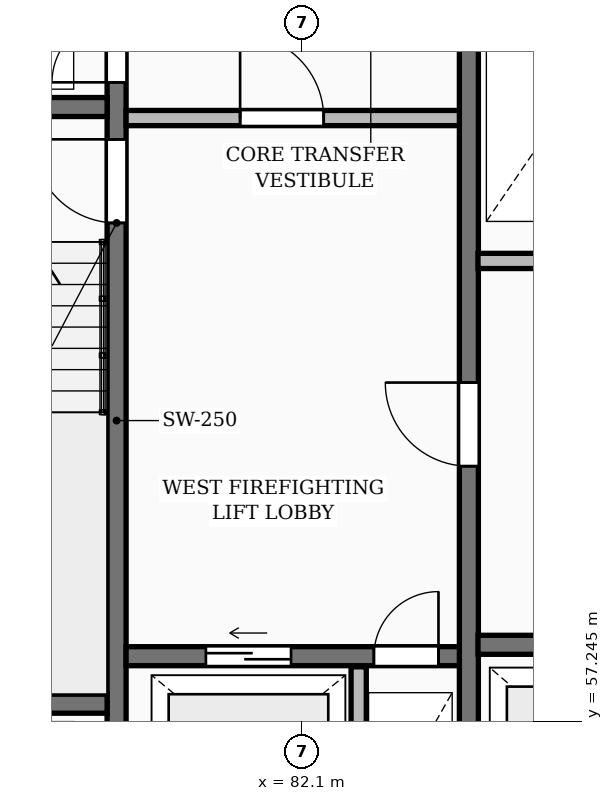
"""IFC4 building model, lengths in metres.
Left out: names, types, materials, properties, quantities, classifications, styles, units other than length and angle.
Written with IfcOpenShell. Run it as: python <this file> out.ifc"""

import sys

from ifc_helpers import new_model, si_unit, direction, frame, frame_2d, origin, place, context, subcontext, project, spatial, rectangle, extrude, element, fill, save


model = new_model("IFC4")
c1 = context("Model", 3, precision=1e-05, world=origin(), true_north=direction((0.0, 1.0)))
c2 = subcontext(c1, "Body", "Model", "MODEL_VIEW")
j1 = project(units=[si_unit("LENGTHUNIT", "METRE"), si_unit("PLANEANGLEUNIT", "RADIAN")], contexts=[c1])
p1 = place(None, origin())
s1 = spatial("IfcSite", under=j1, at=p1, CompositionType="ELEMENT")
p2 = place(p1, origin())
s2 = spatial("IfcBuilding", under=s1, at=p2, CompositionType="ELEMENT")
p3 = place(p2, frame((0.0, 0.0, 93.8)))
s3 = spatial("IfcBuildingStorey", under=s2, at=p3, CompositionType="ELEMENT", Elevation=93.8)
p4 = place(p3, frame((79.665, 55.4, 0.0), z_axis=(0.0, 0.0, 1.0), x_axis=(0.0, 1.0, 0.0)))
e1 = element("IfcWall", 1, at=p4, inside=s3, PredefinedType="SHEAR", context=c2, shape_type="SweptSolid", body=[
    extrude(rectangle(XDim=11.6, YDim=0.25, at=frame_2d((5.8, 0.0))), origin(), (0.0, 0.0, 1.0), 3.25),
])
p5 = place(p4, frame((0.55, 0.0, 0.0)))
e2 = element("IfcOpeningElement", 2, at=p5, cuts=e1, PredefinedType="OPENING", context=c2, shape_type="SweptSolid", body=[
    extrude(rectangle(XDim=0.85, YDim=2.05, at=frame_2d((0.425, 1.025))), frame((0.0, 0.135, 0.0), z_axis=(0.0, -1.0, 0.0), x_axis=(1.0, 0.0, 0.0)), (0.0, 0.0, 1.0), 0.27),
])
p6 = place(p4, frame((8.4, 0.0, 0.0)))
e3 = element("IfcOpeningElement", 3, at=p6, cuts=e1, PredefinedType="OPENING", context=c2, shape_type="SweptSolid", body=[
    extrude(rectangle(XDim=1.1, YDim=2.1, at=frame_2d((0.55, 1.05))), frame((0.0, 0.135, 0.0), z_axis=(0.0, -1.0, 0.0), x_axis=(1.0, 0.0, 0.0)), (0.0, 0.0, 1.0), 0.27),
])
p7 = place(p4, frame((10.25, 0.0, 0.0)))
e4 = element("IfcOpeningElement", 4, at=p7, cuts=e1, PredefinedType="OPENING", context=c2, shape_type="SweptSolid", body=[
    extrude(rectangle(XDim=0.85, YDim=2.05, at=frame_2d((0.425, 1.025))), frame((0.0, 0.135, 0.0), z_axis=(0.0, -1.0, 0.0), x_axis=(1.0, 0.0, 0.0)), (0.0, 0.0, 1.0), 0.27),
])
for number, where, z_axis, x_axis in (
    (5, (76.3, 57.475, 0.0), (0.0, 0.0, 1.0), (1.0, 0.0, 0.0)),
    (6, (76.3, 65.325, 0.0), (0.0, 0.0, 1.0), (1.0, 0.0, 0.0)),
):
    element("IfcWall", number, at=place(p3, frame(where, z_axis=z_axis, x_axis=x_axis)), inside=s3, PredefinedType="SHEAR", context=c2, shape_type="SweptSolid", body=[
        extrude(rectangle(XDim=3.24, YDim=0.25, at=frame_2d((1.62, 0.0))), origin(), (0.0, 0.0, 1.0), 3.25),
    ])
p8 = place(p3, frame((79.79, 58.1, 0.0), z_axis=(0.0, 0.0, 1.0), x_axis=(1.0, 0.0, 0.0)))
e7 = element("IfcWall", 7, at=p8, inside=s3, PredefinedType="SHEAR", context=c2, shape_type="SweptSolid", body=[
    extrude(rectangle(XDim=4.39, YDim=0.25, at=frame_2d((2.195, 0.0))), origin(), (0.0, 0.0, 1.0), 3.25),
])
p9 = place(p8, frame((1.05, 0.0, 0.0)))
e8 = element("IfcOpeningElement", 8, at=p9, cuts=e7, PredefinedType="OPENING", context=c2, shape_type="SweptSolid", body=[
    extrude(rectangle(XDim=1.12, YDim=2.12, at=frame_2d((0.56, 1.06))), frame((0.0, 0.135, 0.0), z_axis=(0.0, -1.0, 0.0), x_axis=(1.0, 0.0, 0.0)), (0.0, 0.0, 1.0), 0.27),
])
p10 = place(p8, frame((3.26, 0.0, 0.0)))
e9 = element("IfcOpeningElement", 9, at=p10, cuts=e7, PredefinedType="OPENING", context=c2, shape_type="SweptSolid", body=[
    extrude(rectangle(XDim=0.85, YDim=2.05, at=frame_2d((0.425, 1.025))), frame((0.0, 0.135, 0.0), z_axis=(0.0, -1.0, 0.0), x_axis=(1.0, 0.0, 0.0)), (0.0, 0.0, 1.0), 0.27),
])
p11 = place(p3, frame((82.85, 55.4, 0.0), z_axis=(0.0, 0.0, 1.0), x_axis=(0.0, 1.0, 0.0)))
e10 = element("IfcWall", 10, at=p11, inside=s3, PredefinedType="PARTITIONING", context=c2, shape_type="SweptSolid", body=[
    extrude(rectangle(XDim=2.56, YDim=0.2, at=frame_2d((1.28, 0.0))), origin(), (0.0, 0.0, 1.0), 2.97),
])
p12 = place(p3, frame((79.79, 65.18, 0.0), z_axis=(0.0, 0.0, 1.0), x_axis=(1.0, 0.0, 0.0)))
e11 = element("IfcWall", 11, at=p12, inside=s3, PredefinedType="PARTITIONING", context=c2, shape_type="SweptSolid", body=[
    extrude(rectangle(XDim=4.39, YDim=0.2, at=frame_2d((2.195, 0.0))), origin(), (0.0, 0.0, 1.0), 2.97),
])
p13 = place(p12, frame((1.5, 0.0, 0.0)))
e12 = element("IfcOpeningElement", 12, at=p13, cuts=e11, PredefinedType="OPENING", context=c2, shape_type="SweptSolid", body=[
    extrude(rectangle(XDim=1.1, YDim=2.1, at=frame_2d((0.55, 1.05))), frame((0.0, 0.11, 0.0), z_axis=(0.0, -1.0, 0.0), x_axis=(1.0, 0.0, 0.0)), (0.0, 0.0, 1.0), 0.22),
])
p14 = place(p3, frame((84.3, 55.4, 0.0), z_axis=(0.0, 0.0, 1.0), x_axis=(0.0, 1.0, 0.0)))
e13 = element("IfcWall", 13, at=p14, inside=s3, PredefinedType="SHEAR", context=c2, shape_type="SweptSolid", body=[
    extrude(rectangle(XDim=11.6, YDim=0.25, at=frame_2d((5.8, 0.0))), origin(), (0.0, 0.0, 1.0), 3.25),
])
p15 = place(p14, frame((5.2, 0.0, 0.0)))
e14 = element("IfcOpeningElement", 14, at=p15, cuts=e13, PredefinedType="OPENING", context=c2, shape_type="SweptSolid", body=[
    extrude(rectangle(XDim=1.1, YDim=2.1, at=frame_2d((0.55, 1.05))), frame((0.0, 0.135, 0.0), z_axis=(0.0, -1.0, 0.0), x_axis=(1.0, 0.0, 0.0)), (0.0, 0.0, 1.0), 0.27),
])
p16 = place(p3, frame((84.42, 58.25, 0.0), z_axis=(0.0, 0.0, 1.0), x_axis=(1.0, 0.0, 0.0)))
e15 = element("IfcWall", 15, at=p16, inside=s3, PredefinedType="SHEAR", context=c2, shape_type="SweptSolid", body=[
    extrude(rectangle(XDim=8.36, YDim=0.25, at=frame_2d((4.18, 0.0))), origin(), (0.0, 0.0, 1.0), 3.25),
])
p17 = place(p16, frame((0.82, 0.0, 0.0)))
e16 = element("IfcOpeningElement", 16, at=p17, cuts=e15, PredefinedType="OPENING", context=c2, shape_type="SweptSolid", body=[
    extrude(rectangle(XDim=1.12, YDim=2.12, at=frame_2d((0.56, 1.06))), frame((0.0, 0.135, 0.0), z_axis=(0.0, -1.0, 0.0), x_axis=(1.0, 0.0, 0.0)), (0.0, 0.0, 1.0), 0.27),
])
p18 = place(p16, frame((3.62, 0.0, 0.0)))
e17 = element("IfcOpeningElement", 17, at=p18, cuts=e15, PredefinedType="OPENING", context=c2, shape_type="SweptSolid", body=[
    extrude(rectangle(XDim=1.12, YDim=2.12, at=frame_2d((0.56, 1.06))), frame((0.0, 0.135, 0.0), z_axis=(0.0, -1.0, 0.0), x_axis=(1.0, 0.0, 0.0)), (0.0, 0.0, 1.0), 0.27),
])
p19 = place(p16, frame((6.42, 0.0, 0.0)))
e18 = element("IfcOpeningElement", 18, at=p19, cuts=e15, PredefinedType="OPENING", context=c2, shape_type="SweptSolid", body=[
    extrude(rectangle(XDim=1.12, YDim=2.12, at=frame_2d((0.56, 1.06))), frame((0.0, 0.135, 0.0), z_axis=(0.0, -1.0, 0.0), x_axis=(1.0, 0.0, 0.0)), (0.0, 0.0, 1.0), 0.27),
])
p20 = place(p3, frame((84.42, 63.3, 0.0), z_axis=(0.0, 0.0, 1.0), x_axis=(1.0, 0.0, 0.0)))
e19 = element("IfcWall", 19, at=p20, inside=s3, PredefinedType="PARTITIONING", context=c2, shape_type="SweptSolid", body=[
    extrude(rectangle(XDim=19.83, YDim=0.2, at=frame_2d((9.915, 0.0))), origin(), (0.0, 0.0, 1.0), 2.97),
])
p21 = place(p20, frame((1.15, 0.0, 0.0)))
e20 = element("IfcOpeningElement", 20, at=p21, cuts=e19, PredefinedType="OPENING", context=c2, shape_type="SweptSolid", body=[
    extrude(rectangle(XDim=0.85, YDim=2.05, at=frame_2d((0.425, 1.025))), frame((0.0, 0.11, 0.0), z_axis=(0.0, -1.0, 0.0), x_axis=(1.0, 0.0, 0.0)), (0.0, 0.0, 1.0), 0.22),
])
p22 = place(p20, frame((3.25, 0.0, 0.0)))
e21 = element("IfcOpeningElement", 21, at=p22, cuts=e19, PredefinedType="OPENING", context=c2, shape_type="SweptSolid", body=[
    extrude(rectangle(XDim=0.85, YDim=2.05, at=frame_2d((0.425, 1.025))), frame((0.0, 0.11, 0.0), z_axis=(0.0, -1.0, 0.0), x_axis=(1.0, 0.0, 0.0)), (0.0, 0.0, 1.0), 0.22),
])
p23 = place(p20, frame((13.08, 0.0, 0.0)))
e22 = element("IfcOpeningElement", 22, at=p23, cuts=e19, PredefinedType="OPENING", context=c2, shape_type="SweptSolid", body=[
    extrude(rectangle(XDim=1.5, YDim=2.2, at=frame_2d((0.75, 1.1))), frame((0.0, 0.11, 0.0), z_axis=(0.0, -1.0, 0.0), x_axis=(1.0, 0.0, 0.0)), (0.0, 0.0, 1.0), 0.22),
])
p24 = place(p20, frame((6.68, 0.0, 0.0)))
e23 = element("IfcOpeningElement", 23, at=p24, cuts=e19, PredefinedType="OPENING", context=c2, shape_type="SweptSolid", body=[
    extrude(rectangle(XDim=0.92, YDim=2.08, at=frame_2d((0.46, 1.04))), frame((0.0, 0.11, 0.0), z_axis=(0.0, -1.0, 0.0), x_axis=(1.0, 0.0, 0.0)), (0.0, 0.0, 1.0), 0.22),
])
p25 = place(p20, frame((16.33, 0.0, 0.0)))
e24 = element("IfcOpeningElement", 24, at=p25, cuts=e19, PredefinedType="OPENING", context=c2, shape_type="SweptSolid", body=[
    extrude(rectangle(XDim=0.88, YDim=2.06, at=frame_2d((0.44, 1.03))), frame((0.0, 0.11, 0.0), z_axis=(0.0, -1.0, 0.0), x_axis=(1.0, 0.0, 0.0)), (0.0, 0.0, 1.0), 0.22),
])
p26 = place(p6, origin())
e25 = element("IfcDoor", 25, at=p26, inside=s3, OperationType="SINGLE_SWING_RIGHT", PredefinedType="DOOR", context=c2, shape_type="SweptSolid", body=[
    extrude(rectangle(XDim=1.1, YDim=2.1, at=frame_2d((0.55, 1.05))), frame((0.0, 0.025, 0.0), z_axis=(0.0, -1.0, 0.0), x_axis=(1.0, 0.0, 0.0)), (0.0, 0.0, 1.0), 0.05),
])
fill(e3, e25)
p27 = place(p7, origin())
e26 = element("IfcDoor", 26, at=p27, inside=s3, OperationType="SINGLE_SWING_LEFT", PredefinedType="DOOR", context=c2, shape_type="SweptSolid", body=[
    extrude(rectangle(XDim=0.85, YDim=2.05, at=frame_2d((0.425, 1.025))), frame((0.0, 0.025, 0.0), z_axis=(0.0, -1.0, 0.0), x_axis=(1.0, 0.0, 0.0)), (0.0, 0.0, 1.0), 0.05),
])
fill(e4, e26)
p28 = place(p9, origin())
e27 = element("IfcDoor", 27, at=p28, inside=s3, OperationType="SLIDING_TO_LEFT", PredefinedType="DOOR", context=c2, shape_type="SweptSolid", body=[
    extrude(rectangle(XDim=1.12, YDim=2.12, at=frame_2d((0.56, 1.06))), frame((0.0, 0.025, 0.0), z_axis=(0.0, -1.0, 0.0), x_axis=(1.0, 0.0, 0.0)), (0.0, 0.0, 1.0), 0.05),
])
fill(e8, e27)
p29 = place(p10, origin())
e28 = element("IfcDoor", 28, at=p29, inside=s3, OperationType="SINGLE_SWING_RIGHT", PredefinedType="DOOR", context=c2, shape_type="SweptSolid", body=[
    extrude(rectangle(XDim=0.85, YDim=2.05, at=frame_2d((0.425, 1.025))), frame((0.0, 0.025, 0.0), z_axis=(0.0, -1.0, 0.0), x_axis=(1.0, 0.0, 0.0)), (0.0, 0.0, 1.0), 0.05),
])
fill(e9, e28)
p30 = place(p13, origin())
e29 = element("IfcDoor", 29, at=p30, inside=s3, OperationType="SINGLE_SWING_LEFT", PredefinedType="DOOR", context=c2, shape_type="SweptSolid", body=[
    extrude(rectangle(XDim=1.1, YDim=2.1, at=frame_2d((0.55, 1.05))), frame((0.0, 0.025, 0.0), z_axis=(0.0, -1.0, 0.0), x_axis=(1.0, 0.0, 0.0)), (0.0, 0.0, 1.0), 0.05),
])
fill(e12, e29)
p31 = place(p15, origin())
e30 = element("IfcDoor", 30, at=p31, inside=s3, OperationType="SINGLE_SWING_RIGHT", PredefinedType="DOOR", context=c2, shape_type="SweptSolid", body=[
    extrude(rectangle(XDim=1.1, YDim=2.1, at=frame_2d((0.55, 1.05))), frame((0.0, 0.025, 0.0), z_axis=(0.0, -1.0, 0.0), x_axis=(1.0, 0.0, 0.0)), (0.0, 0.0, 1.0), 0.05),
])
fill(e14, e30)
save(model, sys.argv[1])
